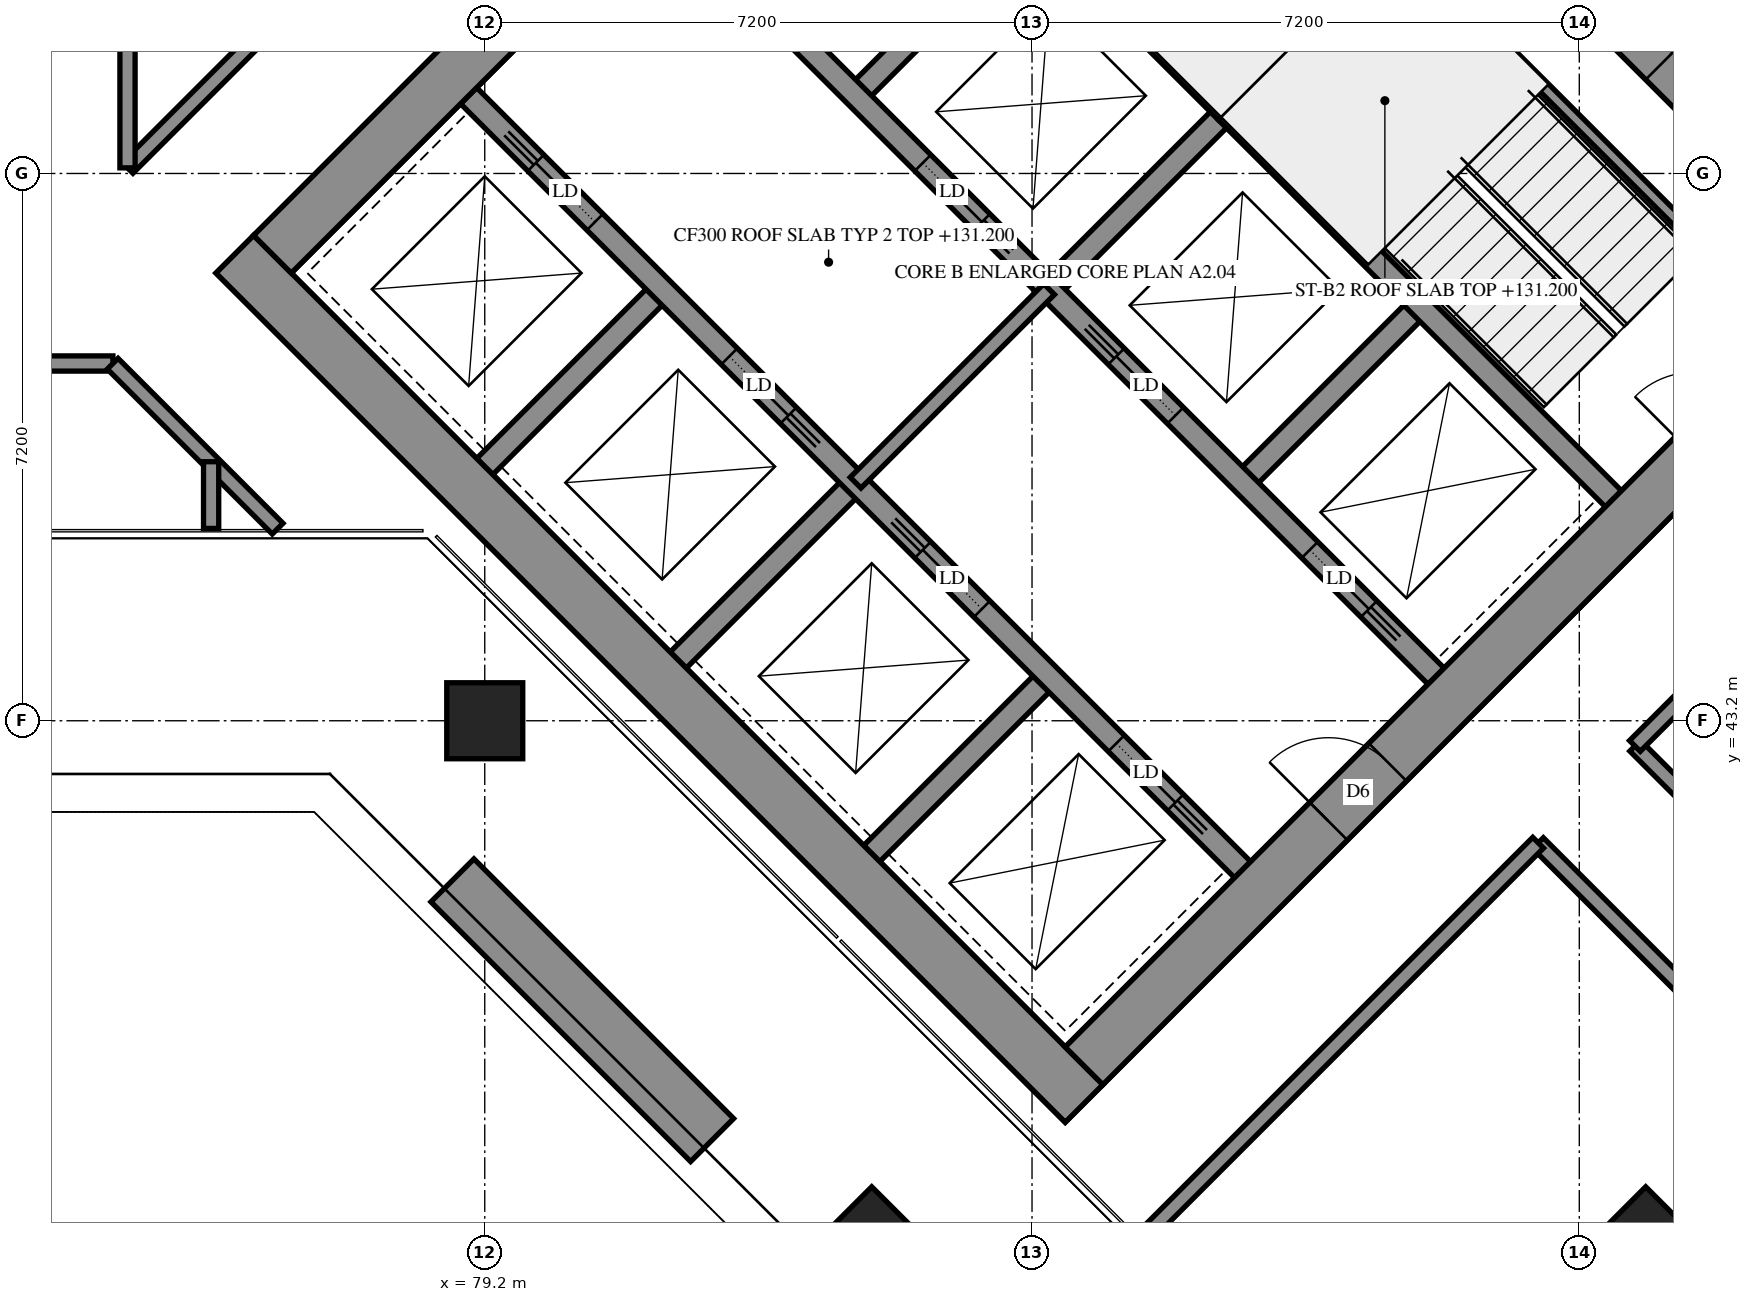
"""IFC4 building model, lengths in metres.
Left out: names, types, materials, properties, quantities, classifications, styles, units other than length and angle.
Written with IfcOpenShell. Run it as: python <this file> out.ifc"""

import sys

from ifc_helpers import new_model, si_unit, direction, frame, frame_2d, origin, origin_2d, place, context, subcontext, project, spatial, rectangle, extrude, element, fill, save


model = new_model("IFC4")
c1 = context("Model", 3, precision=1e-05, world=origin(), true_north=direction((0.0, 1.0)))
c2 = subcontext(c1, "Body", "Model", "MODEL_VIEW")
j1 = project(units=[si_unit("LENGTHUNIT", "METRE"), si_unit("PLANEANGLEUNIT", "RADIAN")], contexts=[c1])
p1 = place(None, origin())
s1 = spatial("IfcSite", under=j1, at=p1, CompositionType="ELEMENT")
p2 = place(p1, origin())
s2 = spatial("IfcBuilding", under=s1, at=p2, CompositionType="ELEMENT")
p3 = place(p2, frame((0.0, 0.0, 131.2)))
s3 = spatial("IfcBuildingStorey", under=s2, at=p3, CompositionType="ELEMENT", Elevation=131.2)
for number, where, z_axis, x_axis in (
    (1, (79.2, 43.2, 0.0), (0.0, 0.0, 1.0), (1.0, 0.0, 0.0)),
    (2, (84.291, 36.362, 0.0), (0.0, 0.0, 1.0), (0.707, -0.707, 0.0)),
    (3, (94.474, 36.362, 0.0), (0.0, 0.0, 1.0), (0.707, -0.707, 0.0)),
):
    element("IfcColumn", number, at=place(p3, frame(where, z_axis=z_axis, x_axis=x_axis)), inside=s3, PredefinedType="COLUMN", context=c2, shape_type="SweptSolid", body=[
        extrude(rectangle(XDim=1.0, YDim=1.0, at=origin_2d()), origin(), (0.0, 0.0, 1.0), 3.9),
    ])
p4 = place(p3, frame((75.912, 49.337, -0.3), z_axis=(0.0, 0.0, 1.0), x_axis=(0.7071036166, -0.7071099457, 0.0)))
e4 = element("IfcWall", 4, at=p4, inside=s3, PredefinedType="SHEAR", context=c2, shape_type="SweptSolid", body=[
    extrude(rectangle(XDim=15.8, YDim=0.7, at=frame_2d((7.9, 0.0))), origin(), (0.0, 0.0, 1.0), 3.5),
])
p5 = place(p3, frame((86.589, 60.014, -0.3), z_axis=(0.0, 0.0, 1.0), x_axis=(0.7071099457, -0.7071036166, 0.0)))
e5 = element("IfcWall", 5, at=p5, inside=s3, PredefinedType="SHEAR", context=c2, shape_type="SweptSolid", body=[
    extrude(rectangle(XDim=15.8, YDim=0.7, at=frame_2d((7.9, 0.0))), origin(), (0.0, 0.0, 1.0), 3.5),
])
p6 = place(p5, frame((10.7, 0.0, 0.3)))
e6 = element("IfcOpeningElement", 6, at=p6, cuts=e5, PredefinedType="OPENING", context=c2, shape_type="SweptSolid", body=[
    extrude(rectangle(XDim=0.8, YDim=2.1, at=frame_2d((0.4, 1.05))), frame((0.0, 0.36, 0.0), z_axis=(0.0, -1.0, 0.0), x_axis=(1.0, 0.0, 0.0)), (0.0, 0.0, 1.0), 0.72),
])
p7 = place(p3, frame((76.407, 49.337, -0.3), z_axis=(0.0, 0.0, 1.0), x_axis=(0.7071067812, 0.7071067812, 0.0)))
e7 = element("IfcWall", 7, at=p7, inside=s3, PredefinedType="SHEAR", context=c2, shape_type="SweptSolid", body=[
    extrude(rectangle(XDim=14.4, YDim=0.7, at=frame_2d((7.2, 0.0))), origin(), (0.0, 0.0, 1.0), 3.5),
])
p8 = place(p7, frame((4.55, 0.0, 0.3)))
e8 = element("IfcOpeningElement", 8, at=p8, cuts=e7, PredefinedType="OPENING", context=c2, shape_type="SweptSolid", body=[
    extrude(rectangle(XDim=1.1, YDim=2.1, at=frame_2d((0.55, 1.05))), frame((0.0, 0.36, 0.0), z_axis=(0.0, -1.0, 0.0), x_axis=(1.0, 0.0, 0.0)), (0.0, 0.0, 1.0), 0.72),
])
p9 = place(p7, frame((11.35, 0.0, 0.3)))
e9 = element("IfcOpeningElement", 9, at=p9, cuts=e7, PredefinedType="OPENING", context=c2, shape_type="SweptSolid", body=[
    extrude(rectangle(XDim=1.1, YDim=2.1, at=frame_2d((0.55, 1.05))), frame((0.0, 0.36, 0.0), z_axis=(0.0, -1.0, 0.0), x_axis=(1.0, 0.0, 0.0)), (0.0, 0.0, 1.0), 0.72),
])
p10 = place(p3, frame((87.084, 38.66, -0.3), z_axis=(0.0, 0.0, 1.0), x_axis=(0.7071067812, 0.7071067812, 0.0)))
e10 = element("IfcWall", 10, at=p10, inside=s3, PredefinedType="SHEAR", context=c2, shape_type="SweptSolid", body=[
    extrude(rectangle(XDim=14.4, YDim=0.7, at=frame_2d((7.2, 0.0))), origin(), (0.0, 0.0, 1.0), 3.5),
])
p11 = place(p10, frame((4.55, 0.0, 0.3)))
e11 = element("IfcOpeningElement", 11, at=p11, cuts=e10, PredefinedType="OPENING", context=c2, shape_type="SweptSolid", body=[
    extrude(rectangle(XDim=1.1, YDim=2.1, at=frame_2d((0.55, 1.05))), frame((0.0, 0.36, 0.0), z_axis=(0.0, -1.0, 0.0), x_axis=(1.0, 0.0, 0.0)), (0.0, 0.0, 1.0), 0.72),
])
p12 = place(p10, frame((11.35, 0.0, 0.3)))
e12 = element("IfcOpeningElement", 12, at=p12, cuts=e10, PredefinedType="OPENING", context=c2, shape_type="SweptSolid", body=[
    extrude(rectangle(XDim=1.1, YDim=2.1, at=frame_2d((0.55, 1.05))), frame((0.0, 0.36, 0.0), z_axis=(0.0, -1.0, 0.0), x_axis=(1.0, 0.0, 0.0)), (0.0, 0.0, 1.0), 0.72),
])
for number, where, z_axis, x_axis in (
    (13, (79.2, 46.544, 0.0), (0.0, 0.0, 1.0), (0.707, 0.707, 0.0)),
    (14, (84.079, 51.423, 0.0), (0.0, 0.0, 1.0), (0.707, 0.707, 0.0)),
):
    element("IfcWall", number, at=place(p3, frame(where, z_axis=z_axis, x_axis=x_axis)), inside=s3, PredefinedType="SOLIDWALL", context=c2, shape_type="SweptSolid", body=[
        extrude(rectangle(XDim=3.3, YDim=0.3, at=frame_2d((1.65, 0.0))), origin(), (0.0, 0.0, 1.0), 3.9),
    ])
p13 = place(p3, frame((81.746, 43.999, 0.0), z_axis=(0.0, 0.0, 1.0), x_axis=(0.7071067812, 0.7071067812, 0.0)))
e15 = element("IfcWall", 15, at=p13, inside=s3, PredefinedType="SOLIDWALL", context=c2, shape_type="SweptSolid", body=[
    extrude(rectangle(XDim=3.3, YDim=0.3, at=frame_2d((1.65, 0.0))), origin(), (0.0, 0.0, 1.0), 3.9),
])
p14 = place(p3, frame((86.625, 48.878, 0.0), z_axis=(0.0, 0.0, 1.0), x_axis=(0.7071067812, 0.7071067812, 0.0)))
e16 = element("IfcWall", 16, at=p14, inside=s3, PredefinedType="SOLIDWALL", context=c2, shape_type="SweptSolid", body=[
    extrude(rectangle(XDim=3.3, YDim=0.3, at=frame_2d((1.65, 0.0))), origin(), (0.0, 0.0, 1.0), 3.9),
])
p15 = place(p3, frame((84.291, 41.453, 0.0), z_axis=(0.0, 0.0, 1.0), x_axis=(0.7071067812, 0.7071067812, 0.0)))
e17 = element("IfcWall", 17, at=p15, inside=s3, PredefinedType="SOLIDWALL", context=c2, shape_type="SweptSolid", body=[
    extrude(rectangle(XDim=3.3, YDim=0.3, at=frame_2d((1.65, 0.0))), origin(), (0.0, 0.0, 1.0), 3.9),
])
p16 = place(p3, frame((89.17, 46.332, 0.0), z_axis=(0.0, 0.0, 1.0), x_axis=(0.7071067812, 0.7071067812, 0.0)))
e18 = element("IfcWall", 18, at=p16, inside=s3, PredefinedType="SOLIDWALL", context=c2, shape_type="SweptSolid", body=[
    extrude(rectangle(XDim=3.3, YDim=0.3, at=frame_2d((1.65, 0.0))), origin(), (0.0, 0.0, 1.0), 3.9),
])
p17 = place(p3, frame((78.988, 51.423, 0.0), z_axis=(0.0, 0.0, 1.0), x_axis=(0.7071067812, -0.7071067812, 0.0)))
e19 = element("IfcWall", 19, at=p17, inside=s3, PredefinedType="SOLIDWALL", context=c2, shape_type="SweptSolid", body=[
    extrude(rectangle(XDim=14.4, YDim=0.3, at=frame_2d((7.2, 0.0))), origin(), (0.0, 0.0, 1.0), 3.9),
])
p18 = place(p17, frame((1.25, 0.0, 0.0)))
e20 = element("IfcOpeningElement", 20, at=p18, cuts=e19, PredefinedType="OPENING", context=c2, shape_type="SweptSolid", body=[
    extrude(rectangle(XDim=1.1, YDim=2.1, at=frame_2d((0.55, 1.05))), frame((0.0, 0.16, 0.0), z_axis=(0.0, -1.0, 0.0), x_axis=(1.0, 0.0, 0.0)), (0.0, 0.0, 1.0), 0.32),
])
p19 = place(p17, frame((4.85, 0.0, 0.0)))
e21 = element("IfcOpeningElement", 21, at=p19, cuts=e19, PredefinedType="OPENING", context=c2, shape_type="SweptSolid", body=[
    extrude(rectangle(XDim=1.1, YDim=2.1, at=frame_2d((0.55, 1.05))), frame((0.0, 0.16, 0.0), z_axis=(0.0, -1.0, 0.0), x_axis=(1.0, 0.0, 0.0)), (0.0, 0.0, 1.0), 0.32),
])
p20 = place(p17, frame((8.45, 0.0, 0.0)))
e22 = element("IfcOpeningElement", 22, at=p20, cuts=e19, PredefinedType="OPENING", context=c2, shape_type="SweptSolid", body=[
    extrude(rectangle(XDim=1.1, YDim=2.1, at=frame_2d((0.55, 1.05))), frame((0.0, 0.16, 0.0), z_axis=(0.0, -1.0, 0.0), x_axis=(1.0, 0.0, 0.0)), (0.0, 0.0, 1.0), 0.32),
])
p21 = place(p17, frame((12.05, 0.0, 0.0)))
e23 = element("IfcOpeningElement", 23, at=p21, cuts=e19, PredefinedType="OPENING", context=c2, shape_type="SweptSolid", body=[
    extrude(rectangle(XDim=1.1, YDim=2.1, at=frame_2d((0.55, 1.05))), frame((0.0, 0.16, 0.0), z_axis=(0.0, -1.0, 0.0), x_axis=(1.0, 0.0, 0.0)), (0.0, 0.0, 1.0), 0.32),
])
p22 = place(p3, frame((81.534, 53.969, 0.0), z_axis=(0.0, 0.0, 1.0), x_axis=(0.707103309, -0.7071102534, 0.0)))
e24 = element("IfcWall", 24, at=p22, inside=s3, PredefinedType="SOLIDWALL", context=c2, shape_type="SweptSolid", body=[
    extrude(rectangle(XDim=14.4, YDim=0.3, at=frame_2d((7.2, 0.0))), origin(), (0.0, 0.0, 1.0), 3.9),
])
p23 = place(p22, frame((1.25, 0.0, 0.0)))
e25 = element("IfcOpeningElement", 25, at=p23, cuts=e24, PredefinedType="OPENING", context=c2, shape_type="SweptSolid", body=[
    extrude(rectangle(XDim=1.1, YDim=2.1, at=frame_2d((0.55, 1.05))), frame((0.0, 0.16, 0.0), z_axis=(0.0, -1.0, 0.0), x_axis=(1.0, 0.0, 0.0)), (0.0, 0.0, 1.0), 0.32),
])
p24 = place(p22, frame((4.85, 0.0, 0.0)))
e26 = element("IfcOpeningElement", 26, at=p24, cuts=e24, PredefinedType="OPENING", context=c2, shape_type="SweptSolid", body=[
    extrude(rectangle(XDim=1.1, YDim=2.1, at=frame_2d((0.55, 1.05))), frame((0.0, 0.16, 0.0), z_axis=(0.0, -1.0, 0.0), x_axis=(1.0, 0.0, 0.0)), (0.0, 0.0, 1.0), 0.32),
])
p25 = place(p22, frame((8.45, 0.0, 0.0)))
e27 = element("IfcOpeningElement", 27, at=p25, cuts=e24, PredefinedType="OPENING", context=c2, shape_type="SweptSolid", body=[
    extrude(rectangle(XDim=1.1, YDim=2.1, at=frame_2d((0.55, 1.05))), frame((0.0, 0.16, 0.0), z_axis=(0.0, -1.0, 0.0), x_axis=(1.0, 0.0, 0.0)), (0.0, 0.0, 1.0), 0.32),
])
p26 = place(p22, frame((12.05, 0.0, 0.0)))
e28 = element("IfcOpeningElement", 28, at=p26, cuts=e24, PredefinedType="OPENING", context=c2, shape_type="SweptSolid", body=[
    extrude(rectangle(XDim=1.1, YDim=2.1, at=frame_2d((0.55, 1.05))), frame((0.0, 0.16, 0.0), z_axis=(0.0, -1.0, 0.0), x_axis=(1.0, 0.0, 0.0)), (0.0, 0.0, 1.0), 0.32),
])
for number, where, z_axis, x_axis in (
    (29, (83.867, 56.302, 0.0), (0.0, 0.0, 1.0), (0.707, -0.707, 0.0)),
    (30, (88.958, 51.211, 0.0), (0.0, 0.0, 1.0), (0.707, -0.707, 0.0)),
):
    element("IfcWall", number, at=place(p3, frame(where, z_axis=z_axis, x_axis=x_axis)), inside=s3, PredefinedType="SOLIDWALL", context=c2, shape_type="SweptSolid", body=[
        extrude(rectangle(XDim=7.2, YDim=0.3, at=frame_2d((3.6, 0.0))), origin(), (0.0, 0.0, 1.0), 3.9),
    ])
p27 = place(p3, frame((88.958, 51.211, 0.0), z_axis=(0.0, 0.0, 1.0), x_axis=(0.7071067812, 0.7071067812, 0.0)))
e31 = element("IfcWall", 31, at=p27, inside=s3, PredefinedType="SOLIDWALL", context=c2, shape_type="SweptSolid", body=[
    extrude(rectangle(XDim=4.2, YDim=0.3, at=frame_2d((2.1, 0.0))), origin(), (0.0, 0.0, 1.0), 3.9),
])
p28 = place(p3, frame((78.775, 41.1, 0.0), z_axis=(0.0, 0.0, 1.0), x_axis=(0.7071067812, -0.7071067812, 0.0)))
e32 = element("IfcWall", 32, at=p28, inside=s3, PredefinedType="SOLIDWALL", context=c2, shape_type="SweptSolid", body=[
    extrude(rectangle(XDim=4.831, YDim=0.8, at=frame_2d((2.416, 0.0))), origin(), (0.0, 0.0, 1.0), 0.65),
])
p29 = place(p3, frame((91.313, 53.354, 0.0), z_axis=(0.0, 0.0, 1.0), x_axis=(0.7071067812, -0.7071067812, 0.0)))
e33 = element("IfcWall", 33, at=p29, inside=s3, PredefinedType="PARTITIONING", context=c2, shape_type="SweptSolid", body=[
    extrude(rectangle(XDim=5.65, YDim=0.15, at=frame_2d((2.825, 0.0))), origin(), (0.0, 0.0, 1.0), 3.9),
])
p30 = place(p3, frame((84.079, 46.332, 0.0), z_axis=(0.0, 0.0, 1.0), x_axis=(0.7071067812, 0.7071067812, 0.0)))
e34 = element("IfcWall", 34, at=p30, inside=s3, PredefinedType="PARTITIONING", context=c2, shape_type="SweptSolid", body=[
    extrude(rectangle(XDim=3.6, YDim=0.2, at=frame_2d((1.8, 0.0))), origin(), (0.0, 0.0, 1.0), 3.9),
])
p31 = place(p3, frame((55.1, 47.9, 0.0), z_axis=(0.0, 0.0, 1.0), x_axis=(1.0, 0.0, 0.0)))
e35 = element("IfcWall", 35, at=p31, inside=s3, PredefinedType="PARTITIONING", context=c2, shape_type="SweptSolid", body=[
    extrude(rectangle(XDim=19.208, YDim=0.2, at=frame_2d((9.604, 0.0))), origin(), (0.0, 0.0, 1.0), 3.9),
])
p32 = place(p3, frame((93.057, 41.591, 0.0), z_axis=(0.0, 0.0, 1.0), x_axis=(0.7071067812, -0.7071067812, 0.0)))
e36 = element("IfcWall", 36, at=p32, inside=s3, PredefinedType="PARTITIONING", context=c2, shape_type="SweptSolid", body=[
    extrude(rectangle(XDim=9.371, YDim=0.2, at=frame_2d((4.685, 0.0))), origin(), (0.0, 0.0, 1.0), 3.9),
])
p33 = place(p32, frame((3.456, 0.0, 0.0)))
e37 = element("IfcOpeningElement", 37, at=p33, cuts=e36, PredefinedType="OPENING", context=c2, shape_type="SweptSolid", body=[
    extrude(rectangle(XDim=1.0, YDim=2.1, at=frame_2d((0.5, 1.05))), frame((0.0, 0.11, 0.0), z_axis=(0.0, -1.0, 0.0), x_axis=(1.0, 0.0, 0.0)), (0.0, 0.0, 1.0), 0.22),
])
p34 = place(p3, frame((94.335, 42.871, 0.0), z_axis=(0.0, 0.0, 1.0), x_axis=(0.7071067812, -0.7071067812, 0.0)))
e38 = element("IfcWall", 38, at=p34, inside=s3, PredefinedType="PARTITIONING", context=c2, shape_type="SweptSolid", body=[
    extrude(rectangle(XDim=9.371, YDim=0.2, at=frame_2d((4.685, 0.0))), origin(), (0.0, 0.0, 1.0), 3.9),
])
p35 = place(p34, frame((1.957, 0.0, 0.0)))
e39 = element("IfcOpeningElement", 39, at=p35, cuts=e38, PredefinedType="OPENING", context=c2, shape_type="SweptSolid", body=[
    extrude(rectangle(XDim=1.0, YDim=2.1, at=frame_2d((0.5, 1.05))), frame((0.0, 0.11, 0.0), z_axis=(0.0, -1.0, 0.0), x_axis=(1.0, 0.0, 0.0)), (0.0, 0.0, 1.0), 0.22),
])
p36 = place(p34, frame((7.057, 0.0, 0.0)))
e40 = element("IfcOpeningElement", 40, at=p36, cuts=e38, PredefinedType="OPENING", context=c2, shape_type="SweptSolid", body=[
    extrude(rectangle(XDim=1.0, YDim=2.1, at=frame_2d((0.5, 1.05))), frame((0.0, 0.11, 0.0), z_axis=(0.0, -1.0, 0.0), x_axis=(1.0, 0.0, 0.0)), (0.0, 0.0, 1.0), 0.22),
])
for number, where, z_axis, x_axis in (
    (41, (94.332, 42.868, 0.0), (0.0, 0.0, 1.0), (0.707, 0.707, 0.0)),
    (42, (87.847, 36.383, 0.0), (0.0, 0.0, 1.0), (0.707, 0.707, 0.0)),
):
    element("IfcWall", number, at=place(p3, frame(where, z_axis=z_axis, x_axis=x_axis)), inside=s3, PredefinedType="PARTITIONING", context=c2, shape_type="SweptSolid", body=[
        extrude(rectangle(XDim=7.371, YDim=0.2, at=frame_2d((3.685, 0.0))), origin(), (0.0, 0.0, 1.0), 3.9),
    ])
p37 = place(p3, frame((74.501, 50.473, 0.0), z_axis=(0.0, 0.0, 1.0), x_axis=(0.7071067812, 0.7071067812, 0.0)))
e43 = element("IfcWall", 43, at=p37, inside=s3, PredefinedType="PARTITIONING", context=c2, shape_type="SweptSolid", body=[
    extrude(rectangle(XDim=3.714, YDim=0.2, at=frame_2d((1.857, 0.0))), origin(), (0.0, 0.0, 1.0), 3.9),
])
p38 = place(p3, frame((74.305, 47.897, 0.0), z_axis=(0.0, 0.0, 1.0), x_axis=(0.7071067812, -0.7071067812, 0.0)))
e44 = element("IfcWall", 44, at=p38, inside=s3, PredefinedType="PARTITIONING", context=c2, shape_type="SweptSolid", body=[
    extrude(rectangle(XDim=3.069, YDim=0.2, at=frame_2d((1.534, 0.0))), origin(), (0.0, 0.0, 1.0), 3.9),
])
p39 = place(p3, frame((74.5, 50.474, 0.0), z_axis=(0.0, 0.0, 1.0), x_axis=(0.0, 1.0, 0.0)))
e45 = element("IfcWall", 45, at=p39, inside=s3, PredefinedType="PARTITIONING", context=c2, shape_type="SweptSolid", body=[
    extrude(rectangle(XDim=2.626, YDim=0.2, at=frame_2d((1.313, 0.0))), origin(), (0.0, 0.0, 1.0), 3.9),
])
p40 = place(p3, frame((75.6, 45.73, 0.0), z_axis=(0.0, 0.0, 1.0), x_axis=(0.0, 1.0, 0.0)))
e46 = element("IfcWall", 46, at=p40, inside=s3, PredefinedType="PARTITIONING", context=c2, shape_type="SweptSolid", body=[
    extrude(rectangle(XDim=0.878, YDim=0.2, at=frame_2d((0.439, 0.0))), origin(), (0.0, 0.0, 1.0), 3.9),
])
p41 = place(p6, origin())
e47 = element("IfcDoor", 47, at=p41, inside=s3, OperationType="SINGLE_SWING_RIGHT", PredefinedType="DOOR", context=c2, shape_type="SweptSolid", body=[
    extrude(rectangle(XDim=0.8, YDim=2.1, at=frame_2d((0.4, 1.05))), frame((0.0, -0.29, 0.0), z_axis=(0.0, -1.0, 0.0), x_axis=(1.0, 0.0, 0.0)), (0.0, 0.0, 1.0), 0.05),
])
fill(e6, e47)
p42 = place(p11, origin())
e48 = element("IfcDoor", 48, at=p42, inside=s3, OperationType="DOUBLE_DOOR_SINGLE_SWING", PredefinedType="DOOR", context=c2, shape_type="SweptSolid", body=[
    extrude(rectangle(XDim=1.1, YDim=2.1, at=frame_2d((0.55, 1.05))), frame((0.0, 0.025, 0.0), z_axis=(0.0, -1.0, 0.0), x_axis=(1.0, 0.0, 0.0)), (0.0, 0.0, 1.0), 0.05),
])
fill(e11, e48)
p43 = place(p18, origin())
e49 = element("IfcDoor", 49, at=p43, inside=s3, OperationType="SLIDING_TO_LEFT", PredefinedType="DOOR", context=c2, shape_type="SweptSolid", body=[
    extrude(rectangle(XDim=1.1, YDim=2.1, at=frame_2d((0.55, 1.05))), frame((0.0, 0.025, 0.0), z_axis=(0.0, -1.0, 0.0), x_axis=(1.0, 0.0, 0.0)), (0.0, 0.0, 1.0), 0.05),
])
fill(e20, e49)
p44 = place(p19, origin())
e50 = element("IfcDoor", 50, at=p44, inside=s3, OperationType="SLIDING_TO_RIGHT", PredefinedType="DOOR", context=c2, shape_type="SweptSolid", body=[
    extrude(rectangle(XDim=1.1, YDim=2.1, at=frame_2d((0.55, 1.05))), frame((0.0, 0.025, 0.0), z_axis=(0.0, -1.0, 0.0), x_axis=(1.0, 0.0, 0.0)), (0.0, 0.0, 1.0), 0.05),
])
fill(e21, e50)
p45 = place(p20, origin())
e51 = element("IfcDoor", 51, at=p45, inside=s3, OperationType="SLIDING_TO_LEFT", PredefinedType="DOOR", context=c2, shape_type="SweptSolid", body=[
    extrude(rectangle(XDim=1.1, YDim=2.1, at=frame_2d((0.55, 1.05))), frame((0.0, 0.025, 0.0), z_axis=(0.0, -1.0, 0.0), x_axis=(1.0, 0.0, 0.0)), (0.0, 0.0, 1.0), 0.05),
])
fill(e22, e51)
p46 = place(p21, origin())
e52 = element("IfcDoor", 52, at=p46, inside=s3, OperationType="SLIDING_TO_RIGHT", PredefinedType="DOOR", context=c2, shape_type="SweptSolid", body=[
    extrude(rectangle(XDim=1.1, YDim=2.1, at=frame_2d((0.55, 1.05))), frame((0.0, 0.025, 0.0), z_axis=(0.0, -1.0, 0.0), x_axis=(1.0, 0.0, 0.0)), (0.0, 0.0, 1.0), 0.05),
])
fill(e23, e52)
p47 = place(p24, origin())
e53 = element("IfcDoor", 53, at=p47, inside=s3, OperationType="SLIDING_TO_RIGHT", PredefinedType="DOOR", context=c2, shape_type="SweptSolid", body=[
    extrude(rectangle(XDim=1.1, YDim=2.1, at=frame_2d((0.55, 1.05))), frame((0.0, 0.025, 0.0), z_axis=(0.0, -1.0, 0.0), x_axis=(1.0, 0.0, 0.0)), (0.0, 0.0, 1.0), 0.05),
])
fill(e26, e53)
p48 = place(p25, origin())
e54 = element("IfcDoor", 54, at=p48, inside=s3, OperationType="SLIDING_TO_LEFT", PredefinedType="DOOR", context=c2, shape_type="SweptSolid", body=[
    extrude(rectangle(XDim=1.1, YDim=2.1, at=frame_2d((0.55, 1.05))), frame((0.0, 0.025, 0.0), z_axis=(0.0, -1.0, 0.0), x_axis=(1.0, 0.0, 0.0)), (0.0, 0.0, 1.0), 0.05),
])
fill(e27, e54)
p49 = place(p26, origin())
e55 = element("IfcDoor", 55, at=p49, inside=s3, OperationType="SLIDING_TO_RIGHT", PredefinedType="DOOR", context=c2, shape_type="SweptSolid", body=[
    extrude(rectangle(XDim=1.1, YDim=2.1, at=frame_2d((0.55, 1.05))), frame((0.0, 0.025, 0.0), z_axis=(0.0, -1.0, 0.0), x_axis=(1.0, 0.0, 0.0)), (0.0, 0.0, 1.0), 0.05),
])
fill(e28, e55)
save(model, sys.argv[1])
